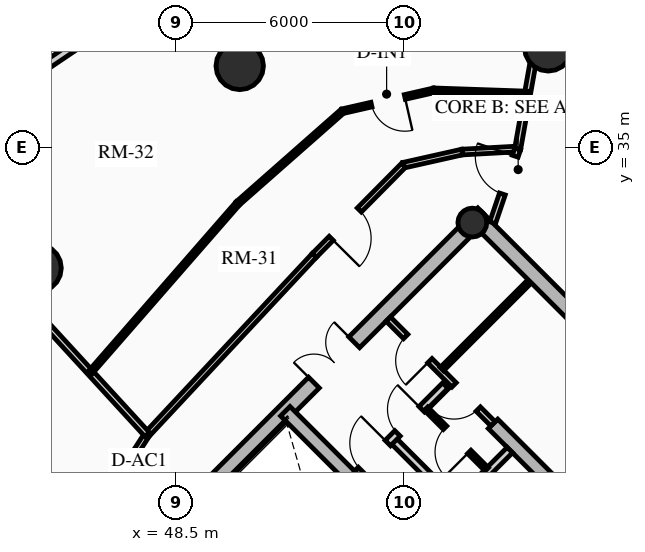
"""IFC4 building model, lengths in metres.
Left out: names, types, materials, properties, quantities, classifications, styles, units other than length and angle.
Written with IfcOpenShell. Run it as: python <this file> out.ifc"""

import sys

from ifc_helpers import new_model, si_unit, direction, frame, frame_2d, origin, origin_2d, place, context, subcontext, project, spatial, rectangle, circle, hollow_circle, extrude, source, transform, mapped, element, fill, save


model = new_model("IFC4")
c1 = context("Model", 3, precision=1e-05, world=origin(), true_north=direction((0.0, 1.0)))
c2 = subcontext(c1, "Body", "Model", "MODEL_VIEW")
j1 = project(units=[si_unit("LENGTHUNIT", "METRE"), si_unit("PLANEANGLEUNIT", "RADIAN")], contexts=[c1])
p1 = place(None, origin())
s1 = spatial("IfcSite", under=j1, at=p1, CompositionType="ELEMENT")
p2 = place(p1, origin())
s2 = spatial("IfcBuilding", under=s1, at=p2, CompositionType="ELEMENT")
p3 = place(p2, frame((0.0, 0.0, 163.24)))
s3 = spatial("IfcBuildingStorey", under=s2, at=p3, CompositionType="ELEMENT", Elevation=163.24)
p4 = place(p3, frame((66.268, 23.298, 0.0), z_axis=(0.0, 0.0, 1.0), x_axis=(-0.707106781187, 0.707106781187, 0.0)))
e1 = element("IfcWall", 1, at=p4, inside=s3, PredefinedType="SHEAR", context=c2, shape_type="SweptSolid", body=[
    extrude(rectangle(XDim=14.1, YDim=0.4, at=frame_2d((7.05, 0.0))), origin(), (0.0, 0.0, 1.0), 2.91),
])
p5 = place(p3, frame((48.873, 25.561, 0.0), z_axis=(0.0, 0.0, 1.0), x_axis=(0.707106781187, 0.707106781187, 0.0)))
e2 = element("IfcWall", 2, at=p5, inside=s3, PredefinedType="SHEAR", context=c2, shape_type="SweptSolid", body=[
    extrude(rectangle(XDim=10.7, YDim=0.4, at=frame_2d((5.35, 0.0))), origin(), (0.0, 0.0, 1.0), 2.91),
])
m1 = source(origin(), c2, "Body", "SweptSolid", [
    extrude(rectangle(XDim=1.5, YDim=2.02, at=frame_2d((0.75, 1.01))), frame((0.0, 0.21, 0.0), z_axis=(0.0, -1.0, 0.0), x_axis=(1.0, 0.0, 0.0)), (0.0, 0.0, 1.0), 0.42),
])
p6 = place(p5, frame((4.6, 0.0, 0.0)))
e3 = element("IfcOpeningElement", 3, at=p6, cuts=e2, PredefinedType="OPENING", context=c2, shape_type="MappedRepresentation", body=[
    mapped(m1, transform((0.0, 0.0, 0.0), x_axis=(1.0, 0.0, 0.0), y_axis=(0.0, 1.0, 0.0), z_axis=(0.0, 0.0, 1.0), scale=1.0)),
])
p7 = place(p3, frame((61.06, 18.373, 0.0), z_axis=(0.0, 0.0, 1.0), x_axis=(-0.707106781187, 0.707106781187, 0.0)))
e4 = element("IfcWall", 4, at=p7, inside=s3, PredefinedType="SHEAR", context=c2, shape_type="SweptSolid", body=[
    extrude(rectangle(XDim=13.7, YDim=0.35, at=frame_2d((6.85, 0.0))), origin(), (0.0, 0.0, 1.0), 2.91),
])
m2 = source(origin(), c2, "Body", "SweptSolid", [
    extrude(rectangle(XDim=1.1, YDim=2.015, at=frame_2d((0.55, 1.007))), frame((0.0, 0.185, 0.0), z_axis=(0.0, -1.0, 0.0), x_axis=(1.0, 0.0, 0.0)), (0.0, 0.0, 1.0), 0.37),
])
p8 = place(p7, frame((4.85, 0.0, 0.0)))
e5 = element("IfcOpeningElement", 5, at=p8, cuts=e4, PredefinedType="OPENING", context=c2, shape_type="MappedRepresentation", body=[
    mapped(m2, transform((0.0, 0.0, 0.0), x_axis=(1.0, 0.0, 0.0), y_axis=(0.0, 1.0, 0.0), z_axis=(0.0, 0.0, 1.0), scale=1.0)),
])
p9 = place(p7, frame((0.625, 0.0, 0.0)))
e6 = element("IfcOpeningElement", 6, at=p9, cuts=e4, PredefinedType="OPENING", context=c2, shape_type="MappedRepresentation", body=[
    mapped(m2, transform((0.0, 0.0, 0.0), x_axis=(1.0, 0.0, 0.0), y_axis=(0.0, 1.0, 0.0), z_axis=(0.0, 0.0, 1.0), scale=1.0)),
])
p10 = place(p7, frame((2.625, 0.0, 0.0)))
e7 = element("IfcOpeningElement", 7, at=p10, cuts=e4, PredefinedType="OPENING", context=c2, shape_type="MappedRepresentation", body=[
    mapped(m2, transform((0.0, 0.0, 0.0), x_axis=(1.0, 0.0, 0.0), y_axis=(0.0, 1.0, 0.0), z_axis=(0.0, 0.0, 1.0), scale=1.0)),
])
m3 = source(origin(), c2, "Body", "SweptSolid", [
    extrude(rectangle(XDim=1.15, YDim=2.02, at=frame_2d((0.575, 1.01))), frame((0.0, 0.185, 0.0), z_axis=(0.0, -1.0, 0.0), x_axis=(1.0, 0.0, 0.0)), (0.0, 0.0, 1.0), 0.37),
])
p11 = place(p7, frame((7.27, 0.0, 0.0)))
e8 = element("IfcOpeningElement", 8, at=p11, cuts=e4, PredefinedType="OPENING", context=c2, shape_type="MappedRepresentation", body=[
    mapped(m3, transform((0.0, 0.0, 0.0), x_axis=(1.0, 0.0, 0.0), y_axis=(0.0, 1.0, 0.0), z_axis=(0.0, 0.0, 1.0), scale=1.0)),
])
p12 = place(p3, frame((63.627, 20.94, 0.0), z_axis=(0.0, 0.0, 1.0), x_axis=(-0.707119496762, 0.707094065383, 0.0)))
e9 = element("IfcWall", 9, at=p12, inside=s3, PredefinedType="SHEAR", context=c2, shape_type="SweptSolid", body=[
    extrude(rectangle(XDim=9.6, YDim=0.35, at=frame_2d((4.8, 0.0))), origin(), (0.0, 0.0, 1.0), 2.91),
])
p13 = place(p12, frame((5.28, 0.0, 0.0)))
e10 = element("IfcOpeningElement", 10, at=p13, cuts=e9, PredefinedType="OPENING", context=c2, shape_type="MappedRepresentation", body=[
    mapped(m3, transform((0.0, 0.0, 0.0), x_axis=(1.0, 0.0, 0.0), y_axis=(0.0, 1.0, 0.0), z_axis=(0.0, 0.0, 1.0), scale=1.0)),
])
p14 = place(p3, frame((56.294, 33.024, 0.0), z_axis=(0.0, 0.0, 1.0), x_axis=(0.707106781187, 0.707106781187, 0.0)))
e11 = element("IfcColumn", 11, at=p14, inside=s3, PredefinedType="COLUMN", context=c2, shape_type="SweptSolid", body=[
    extrude(hollow_circle(Radius=0.38, WallThickness=0.032, at=origin_2d()), origin(), (0.0, 0.0, 1.0), 2.91),
])
for number, where, z_axis, x_axis in (
    (12, (58.291, 37.635, 0.0), (0.0, 0.0, 1.0), (1.0, 0.0, 0.0)),
    (13, (50.173, 37.146, 0.0), (0.0, 0.0, 1.0), (1.0, 0.0, 0.0)),
    (14, (44.854, 31.827, 0.0), (0.0, 0.0, 1.0), (1.0, 0.0, 0.0)),
):
    element("IfcColumn", number, at=place(p3, frame(where, z_axis=z_axis, x_axis=x_axis)), inside=s3, PredefinedType="USERDEFINED", context=c2, shape_type="SweptSolid", body=[
        extrude(circle(Radius=0.625, at=origin_2d()), origin(), (0.0, 0.0, 1.0), 2.91),
    ])
p15 = place(p3, frame((44.935, 37.065, 0.0), z_axis=(0.0, 0.0, 1.0), x_axis=(0.828739009952, 0.559635286042, 0.0)))
e15 = element("IfcWall", 15, at=p15, inside=s3, PredefinedType="SOLIDWALL", context=c2, shape_type="SweptSolid", body=[
    extrude(rectangle(XDim=4.569, YDim=0.22, at=frame_2d((2.284, 0.0))), origin(), (0.0, 0.0, 1.0), 2.245),
])
p16 = place(p3, frame((54.961, 24.719, 0.0), z_axis=(0.0, 0.0, 1.0), x_axis=(0.707106781187, 0.707106781187, 0.0)))
e16 = element("IfcWall", 16, at=p16, inside=s3, PredefinedType="PARTITIONING", context=c2, shape_type="SweptSolid", body=[
    extrude(rectangle(XDim=3.28, YDim=0.2, at=frame_2d((1.64, 0.0))), origin(), (0.0, 0.0, 1.0), 2.675),
])
m4 = source(origin(), c2, "Body", "SweptSolid", [
    extrude(rectangle(XDim=0.9, YDim=2.005, at=frame_2d((0.45, 1.002))), frame((0.0, 0.11, 0.0), z_axis=(0.0, -1.0, 0.0), x_axis=(1.0, 0.0, 0.0)), (0.0, 0.0, 1.0), 0.22),
])
p17 = place(p16, frame((0.16, 0.0, 0.0)))
e17 = element("IfcOpeningElement", 17, at=p17, cuts=e16, PredefinedType="OPENING", context=c2, shape_type="MappedRepresentation", body=[
    mapped(m4, transform((0.0, 0.0, 0.0), x_axis=(1.0, 0.0, 0.0), y_axis=(0.0, 1.0, 0.0), z_axis=(0.0, 0.0, 1.0), scale=1.0)),
])
p18 = place(p3, frame((55.874, 25.631, 0.0), z_axis=(0.0, 0.0, 1.0), x_axis=(-0.707157639372, 0.707055919343, 0.0)))
e18 = element("IfcWall", 18, at=p18, inside=s3, PredefinedType="PARTITIONING", context=c2, shape_type="SweptSolid", body=[
    extrude(rectangle(XDim=2.4, YDim=0.2, at=frame_2d((1.2, 0.0))), origin(), (0.0, 0.0, 1.0), 2.675),
])
p19 = place(p3, frame((53.264, 26.416, 0.0), z_axis=(0.0, 0.0, 1.0), x_axis=(0.707106781187, 0.707106781187, 0.0)))
e19 = element("IfcWall", 19, at=p19, inside=s3, PredefinedType="PARTITIONING", context=c2, shape_type="SweptSolid", body=[
    extrude(rectangle(XDim=3.28, YDim=0.2, at=frame_2d((1.64, 0.0))), origin(), (0.0, 0.0, 1.0), 2.675),
])
m5 = source(origin(), c2, "Body", "SweptSolid", [
    extrude(rectangle(XDim=1.0, YDim=2.015, at=frame_2d((0.5, 1.007))), frame((0.0, 0.11, 0.0), z_axis=(0.0, -1.0, 0.0), x_axis=(1.0, 0.0, 0.0)), (0.0, 0.0, 1.0), 0.22),
])
p20 = place(p19, frame((0.14, 0.0, 0.0)))
e20 = element("IfcOpeningElement", 20, at=p20, cuts=e19, PredefinedType="OPENING", context=c2, shape_type="MappedRepresentation", body=[
    mapped(m5, transform((0.0, 0.0, 0.0), x_axis=(1.0, 0.0, 0.0), y_axis=(0.0, 1.0, 0.0), z_axis=(0.0, 0.0, 1.0), scale=1.0)),
])
p21 = place(p19, frame((1.5, 0.0, 0.0)))
e21 = element("IfcOpeningElement", 21, at=p21, cuts=e19, PredefinedType="OPENING", context=c2, shape_type="MappedRepresentation", body=[
    mapped(m4, transform((0.0, 0.0, 0.0), x_axis=(1.0, 0.0, 0.0), y_axis=(0.0, 1.0, 0.0), z_axis=(0.0, 0.0, 1.0), scale=1.0)),
])
p22 = place(p3, frame((56.673, 26.529, 0.0), z_axis=(0.0, 0.0, 1.0), x_axis=(-0.707052764397, 0.70716079385, 0.0)))
e22 = element("IfcWall", 22, at=p22, inside=s3, PredefinedType="PARTITIONING", context=c2, shape_type="SweptSolid", body=[
    extrude(rectangle(XDim=2.26, YDim=0.125, at=frame_2d((1.13, 0.0))), origin(), (0.0, 0.0, 1.0), 2.675),
])
m6 = source(origin(), c2, "Body", "SweptSolid", [
    extrude(rectangle(XDim=0.9, YDim=2.005, at=frame_2d((0.45, 1.002))), frame((0.0, 0.073, 0.0), z_axis=(0.0, -1.0, 0.0), x_axis=(1.0, 0.0, 0.0)), (0.0, 0.0, 1.0), 0.145),
])
p23 = place(p22, frame((0.65, 0.0, 0.0)))
e23 = element("IfcOpeningElement", 23, at=p23, cuts=e22, PredefinedType="OPENING", context=c2, shape_type="MappedRepresentation", body=[
    mapped(m6, transform((0.0, 0.0, 0.0), x_axis=(1.0, 0.0, 0.0), y_axis=(0.0, 1.0, 0.0), z_axis=(0.0, 0.0, 1.0), scale=1.0)),
])
p24 = place(p3, frame((56.839, 27.728, 0.0), z_axis=(0.0, 0.0, 1.0), x_axis=(-0.707106781187, 0.707106781187, 0.0)))
e24 = element("IfcWall", 24, at=p24, inside=s3, PredefinedType="PARTITIONING", context=c2, shape_type="SweptSolid", body=[
    extrude(rectangle(XDim=3.9, YDim=0.16, at=frame_2d((1.95, 0.0))), origin(), (0.0, 0.0, 1.0), 2.675),
])
m7 = source(origin(), c2, "Body", "SweptSolid", [
    extrude(rectangle(XDim=0.9, YDim=2.005, at=frame_2d((0.45, 1.002))), frame((0.0, 0.09, 0.0), z_axis=(0.0, -1.0, 0.0), x_axis=(1.0, 0.0, 0.0)), (0.0, 0.0, 1.0), 0.18),
])
p25 = place(p24, frame((0.55, 0.0, 0.0)))
e25 = element("IfcOpeningElement", 25, at=p25, cuts=e24, PredefinedType="OPENING", context=c2, shape_type="MappedRepresentation", body=[
    mapped(m7, transform((0.0, 0.0, 0.0), x_axis=(1.0, 0.0, 0.0), y_axis=(0.0, 1.0, 0.0), z_axis=(0.0, 0.0, 1.0), scale=1.0)),
])
p26 = place(p24, frame((2.35, 0.0, 0.0)))
e26 = element("IfcOpeningElement", 26, at=p26, cuts=e24, PredefinedType="OPENING", context=c2, shape_type="MappedRepresentation", body=[
    mapped(m7, transform((0.0, 0.0, 0.0), x_axis=(1.0, 0.0, 0.0), y_axis=(0.0, 1.0, 0.0), z_axis=(0.0, 0.0, 1.0), scale=1.0)),
])
p27 = place(p3, frame((55.492, 29.167, 0.0), z_axis=(0.0, 0.0, 1.0), x_axis=(0.707144688645, 0.707068871696, 0.0)))
e27 = element("IfcWall", 27, at=p27, inside=s3, PredefinedType="PARTITIONING", context=c2, shape_type="SweptSolid", body=[
    extrude(rectangle(XDim=3.22, YDim=0.125, at=frame_2d((1.61, 0.0))), origin(), (0.0, 0.0, 1.0), 2.212),
])
p28 = place(p3, frame((57.486, 34.96, 0.0), z_axis=(0.0, 0.0, 1.0), x_axis=(-0.998483871836, -0.055045051404, 0.0)))
e28 = element("IfcWall", 28, at=p28, inside=s3, PredefinedType="PARTITIONING", context=c2, shape_type="SweptSolid", body=[
    extrude(rectangle(XDim=1.464, YDim=0.15, at=frame_2d((0.732, 0.0))), origin(), (0.0, 0.0, 1.0), 2.245),
])
p29 = place(p3, frame((56.025, 34.88, 0.0), z_axis=(0.0, 0.0, 1.0), x_axis=(-0.975729093394, -0.218981132301, 0.0)))
e29 = element("IfcWall", 29, at=p29, inside=s3, PredefinedType="PARTITIONING", context=c2, shape_type="SweptSolid", body=[
    extrude(rectangle(XDim=1.575, YDim=0.15, at=frame_2d((0.788, 0.0))), origin(), (0.0, 0.0, 1.0), 2.245),
])
p30 = place(p3, frame((54.488, 34.535, 0.0), z_axis=(0.0, 0.0, 1.0), x_axis=(-0.703666289339, -0.710530613871, 0.0)))
e30 = element("IfcWall", 30, at=p30, inside=s3, PredefinedType="PARTITIONING", context=c2, shape_type="SweptSolid", body=[
    extrude(rectangle(XDim=3.343, YDim=0.15, at=frame_2d((1.672, 0.0))), origin(), (0.0, 0.0, 1.0), 2.245),
])
m8 = source(origin(), c2, "Body", "SweptSolid", [
    extrude(rectangle(XDim=1.05, YDim=2.015, at=frame_2d((0.525, 1.007))), frame((0.0, 0.085, 0.0), z_axis=(0.0, -1.0, 0.0), x_axis=(1.0, 0.0, 0.0)), (0.0, 0.0, 1.0), 0.17),
])
p31 = place(p30, frame((1.66, 0.0, 0.0)))
e31 = element("IfcOpeningElement", 31, at=p31, cuts=e30, PredefinedType="OPENING", context=c2, shape_type="MappedRepresentation", body=[
    mapped(m8, transform((0.0, 0.0, 0.0), x_axis=(1.0, 0.0, 0.0), y_axis=(0.0, 1.0, 0.0), z_axis=(0.0, 0.0, 1.0), scale=1.0)),
])
p32 = place(p3, frame((52.135, 32.159, 0.0), z_axis=(0.0, 0.0, 1.0), x_axis=(-0.682546302454, -0.730842353047, 0.0)))
e32 = element("IfcWall", 32, at=p32, inside=s3, PredefinedType="PARTITIONING", context=c2, shape_type="SweptSolid", body=[
    extrude(rectangle(XDim=6.445, YDim=0.15, at=frame_2d((3.223, 0.0))), origin(), (0.0, 0.0, 1.0), 2.245),
])
p33 = place(p3, frame((47.736, 27.449, 0.0), z_axis=(0.0, 0.0, 1.0), x_axis=(-0.542589259408, -0.839998152126, 0.0)))
e33 = element("IfcWall", 33, at=p33, inside=s3, PredefinedType="PARTITIONING", context=c2, shape_type="SweptSolid", body=[
    extrude(rectangle(XDim=1.912, YDim=0.15, at=frame_2d((0.956, 0.0))), origin(), (0.0, 0.0, 1.0), 2.245),
])
p34 = place(p3, frame((57.486, 34.96, 0.0), z_axis=(0.0, 0.0, 1.0), x_axis=(0.175432895983, 0.984491391027, 0.0)))
e34 = element("IfcWall", 34, at=p34, inside=s3, PredefinedType="PARTITIONING", context=c2, shape_type="SweptSolid", body=[
    extrude(rectangle(XDim=5.291, YDim=0.16, at=frame_2d((2.646, 0.0))), origin(), (0.0, 0.0, 1.0), 2.245),
])
p35 = place(p3, frame((47.736, 27.449, 0.0), z_axis=(0.0, 0.0, 1.0), x_axis=(-0.676056254668, 0.736850012231, 0.0)))
e35 = element("IfcWall", 35, at=p35, inside=s3, PredefinedType="PARTITIONING", context=c2, shape_type="SweptSolid", body=[
    extrude(rectangle(XDim=7.899, YDim=0.16, at=frame_2d((3.95, 0.0))), origin(), (0.0, 0.0, 1.0), 2.245),
])
p36 = place(p3, frame((56.828, 33.021, 0.0), z_axis=(0.0, 0.0, 1.0), x_axis=(0.321300161671, 0.94697740528, 0.0)))
e36 = element("IfcWall", 36, at=p36, inside=s3, PredefinedType="PARTITIONING", context=c2, shape_type="SweptSolid", body=[
    extrude(rectangle(XDim=2.049, YDim=0.16, at=frame_2d((1.024, 0.0))), origin(), (0.0, 0.0, 1.0), 2.245),
])
m9 = source(origin(), c2, "Body", "SweptSolid", [
    extrude(rectangle(XDim=1.05, YDim=2.015, at=frame_2d((0.525, 1.007))), frame((0.0, 0.09, 0.0), z_axis=(0.0, -1.0, 0.0), x_axis=(1.0, 0.0, 0.0)), (0.0, 0.0, 1.0), 0.18),
])
p37 = place(p36, frame((0.798, 0.0, 0.0)))
e37 = element("IfcOpeningElement", 37, at=p37, cuts=e36, PredefinedType="OPENING", context=c2, shape_type="MappedRepresentation", body=[
    mapped(m9, transform((0.0, 0.0, 0.0), x_axis=(1.0, 0.0, 0.0), y_axis=(0.0, 1.0, 0.0), z_axis=(0.0, 0.0, 1.0), scale=1.0)),
])
p38 = place(p3, frame((57.746, 36.419, 0.0), z_axis=(0.0, 0.0, 1.0), x_axis=(-0.999409872703, 0.03434976484, 0.0)))
e38 = element("IfcWall", 38, at=p38, inside=s3, PredefinedType="PARTITIONING", context=c2, shape_type="SweptSolid", body=[
    extrude(rectangle(XDim=2.466, YDim=0.125, at=frame_2d((1.233, 0.0))), origin(), (0.0, 0.0, 1.0), 2.245),
])
p39 = place(p3, frame((55.281, 36.504, 0.0), z_axis=(0.0, 0.0, 1.0), x_axis=(-0.974908832019, -0.222604513096, 0.0)))
e39 = element("IfcWall", 39, at=p39, inside=s3, PredefinedType="PARTITIONING", context=c2, shape_type="SweptSolid", body=[
    extrude(rectangle(XDim=2.468, YDim=0.125, at=frame_2d((1.234, 0.0))), origin(), (0.0, 0.0, 1.0), 2.245),
])
p40 = place(p39, frame((0.784, 0.0, 0.0)))
e40 = element("IfcOpeningElement", 40, at=p40, cuts=e39, PredefinedType="OPENING", context=c2, shape_type="MappedRepresentation", body=[
    mapped(m6, transform((0.0, 0.0, 0.0), x_axis=(1.0, 0.0, 0.0), y_axis=(0.0, 1.0, 0.0), z_axis=(0.0, 0.0, 1.0), scale=1.0)),
])
p41 = place(p3, frame((52.876, 35.954, 0.0), z_axis=(0.0, 0.0, 1.0), x_axis=(-0.750317340408, -0.661077823469, 0.0)))
e41 = element("IfcWall", 41, at=p41, inside=s3, PredefinedType="PARTITIONING", context=c2, shape_type="SweptSolid", body=[
    extrude(rectangle(XDim=3.669, YDim=0.125, at=frame_2d((1.834, 0.0))), origin(), (0.0, 0.0, 1.0), 2.245),
])
p42 = place(p3, frame((50.123, 33.529, 0.0), z_axis=(0.0, 0.0, 1.0), x_axis=(-0.657371249324, -0.753566878626, 0.0)))
e42 = element("IfcWall", 42, at=p42, inside=s3, PredefinedType="PARTITIONING", context=c2, shape_type="SweptSolid", body=[
    extrude(rectangle(XDim=5.906, YDim=0.125, at=frame_2d((2.953, 0.0))), origin(), (0.0, 0.0, 1.0), 2.245),
])
m10 = source(origin(), c2, "Body", "SweptSolid", [
    extrude(rectangle(XDim=1.5, YDim=2.02, at=frame_2d((0.75, 1.01))), frame((0.0, 0.025, 0.0), z_axis=(0.0, -1.0, 0.0), x_axis=(1.0, 0.0, 0.0)), (0.0, 0.0, 1.0), 0.05),
])
p43 = place(p6, origin())
e43 = element("IfcDoor", 43, at=p43, inside=s3, OperationType="DOUBLE_DOOR_SINGLE_SWING", PredefinedType="DOOR", context=c2, shape_type="MappedRepresentation", body=[
    mapped(m10, transform((0.0, 0.0, 0.0), x_axis=(1.0, 0.0, 0.0), y_axis=(0.0, 1.0, 0.0), z_axis=(0.0, 0.0, 1.0), scale=1.0)),
])
fill(e3, e43)
m11 = source(origin(), c2, "Body", "SweptSolid", [
    extrude(rectangle(XDim=1.0, YDim=2.015, at=frame_2d((0.5, 1.007))), frame((0.0, 0.025, 0.0), z_axis=(0.0, -1.0, 0.0), x_axis=(1.0, 0.0, 0.0)), (0.0, 0.0, 1.0), 0.05),
])
p44 = place(p20, origin())
e44 = element("IfcDoor", 44, at=p44, inside=s3, OperationType="SINGLE_SWING_RIGHT", PredefinedType="DOOR", context=c2, shape_type="MappedRepresentation", body=[
    mapped(m11, transform((0.0, 0.0, 0.0), x_axis=(1.0, 0.0, 0.0), y_axis=(0.0, 1.0, 0.0), z_axis=(0.0, 0.0, 1.0), scale=1.0)),
])
fill(e20, e44)
m12 = source(origin(), c2, "Body", "SweptSolid", [
    extrude(rectangle(XDim=0.9, YDim=2.005, at=frame_2d((0.45, 1.002))), frame((0.0, 0.025, 0.0), z_axis=(0.0, -1.0, 0.0), x_axis=(1.0, 0.0, 0.0)), (0.0, 0.0, 1.0), 0.05),
])
p45 = place(p21, origin())
e45 = element("IfcDoor", 45, at=p45, inside=s3, OperationType="SINGLE_SWING_RIGHT", PredefinedType="DOOR", context=c2, shape_type="MappedRepresentation", body=[
    mapped(m12, transform((0.0, 0.0, 0.0), x_axis=(1.0, 0.0, 0.0), y_axis=(0.0, 1.0, 0.0), z_axis=(0.0, 0.0, 1.0), scale=1.0)),
])
fill(e21, e45)
p46 = place(p23, origin())
e46 = element("IfcDoor", 46, at=p46, inside=s3, OperationType="SINGLE_SWING_LEFT", PredefinedType="DOOR", context=c2, shape_type="MappedRepresentation", body=[
    mapped(m12, transform((0.0, 0.0, 0.0), x_axis=(1.0, 0.0, 0.0), y_axis=(0.0, 1.0, 0.0), z_axis=(0.0, 0.0, 1.0), scale=1.0)),
])
fill(e23, e46)
p47 = place(p25, origin())
e47 = element("IfcDoor", 47, at=p47, inside=s3, OperationType="SINGLE_SWING_RIGHT", PredefinedType="DOOR", context=c2, shape_type="MappedRepresentation", body=[
    mapped(m12, transform((0.0, 0.0, 0.0), x_axis=(1.0, 0.0, 0.0), y_axis=(0.0, 1.0, 0.0), z_axis=(0.0, 0.0, 1.0), scale=1.0)),
])
fill(e25, e47)
p48 = place(p26, origin())
e48 = element("IfcDoor", 48, at=p48, inside=s3, OperationType="SINGLE_SWING_LEFT", PredefinedType="DOOR", context=c2, shape_type="MappedRepresentation", body=[
    mapped(m12, transform((0.0, 0.0, 0.0), x_axis=(1.0, 0.0, 0.0), y_axis=(0.0, 1.0, 0.0), z_axis=(0.0, 0.0, 1.0), scale=1.0)),
])
fill(e26, e48)
m13 = source(origin(), c2, "Body", "SweptSolid", [
    extrude(rectangle(XDim=1.05, YDim=2.015, at=frame_2d((0.525, 1.007))), frame((0.0, 0.025, 0.0), z_axis=(0.0, -1.0, 0.0), x_axis=(1.0, 0.0, 0.0)), (0.0, 0.0, 1.0), 0.05),
])
p49 = place(p37, origin())
e49 = element("IfcDoor", 49, at=p49, inside=s3, OperationType="SINGLE_SWING_RIGHT", PredefinedType="DOOR", context=c2, shape_type="MappedRepresentation", body=[
    mapped(m13, transform((0.0, 0.0, 0.0), x_axis=(1.0, 0.0, 0.0), y_axis=(0.0, 1.0, 0.0), z_axis=(0.0, 0.0, 1.0), scale=1.0)),
])
fill(e37, e49)
p50 = place(p31, origin())
e50 = element("IfcDoor", 50, at=p50, inside=s3, OperationType="SINGLE_SWING_RIGHT", PredefinedType="DOOR", context=c2, shape_type="MappedRepresentation", body=[
    mapped(m13, transform((0.0, 0.0, 0.0), x_axis=(1.0, 0.0, 0.0), y_axis=(0.0, 1.0, 0.0), z_axis=(0.0, 0.0, 1.0), scale=1.0)),
])
fill(e31, e50)
p51 = place(p40, origin())
e51 = element("IfcDoor", 51, at=p51, inside=s3, OperationType="SINGLE_SWING_LEFT", PredefinedType="DOOR", context=c2, shape_type="MappedRepresentation", body=[
    mapped(m12, transform((0.0, 0.0, 0.0), x_axis=(1.0, 0.0, 0.0), y_axis=(0.0, 1.0, 0.0), z_axis=(0.0, 0.0, 1.0), scale=1.0)),
])
fill(e40, e51)
save(model, sys.argv[1])
